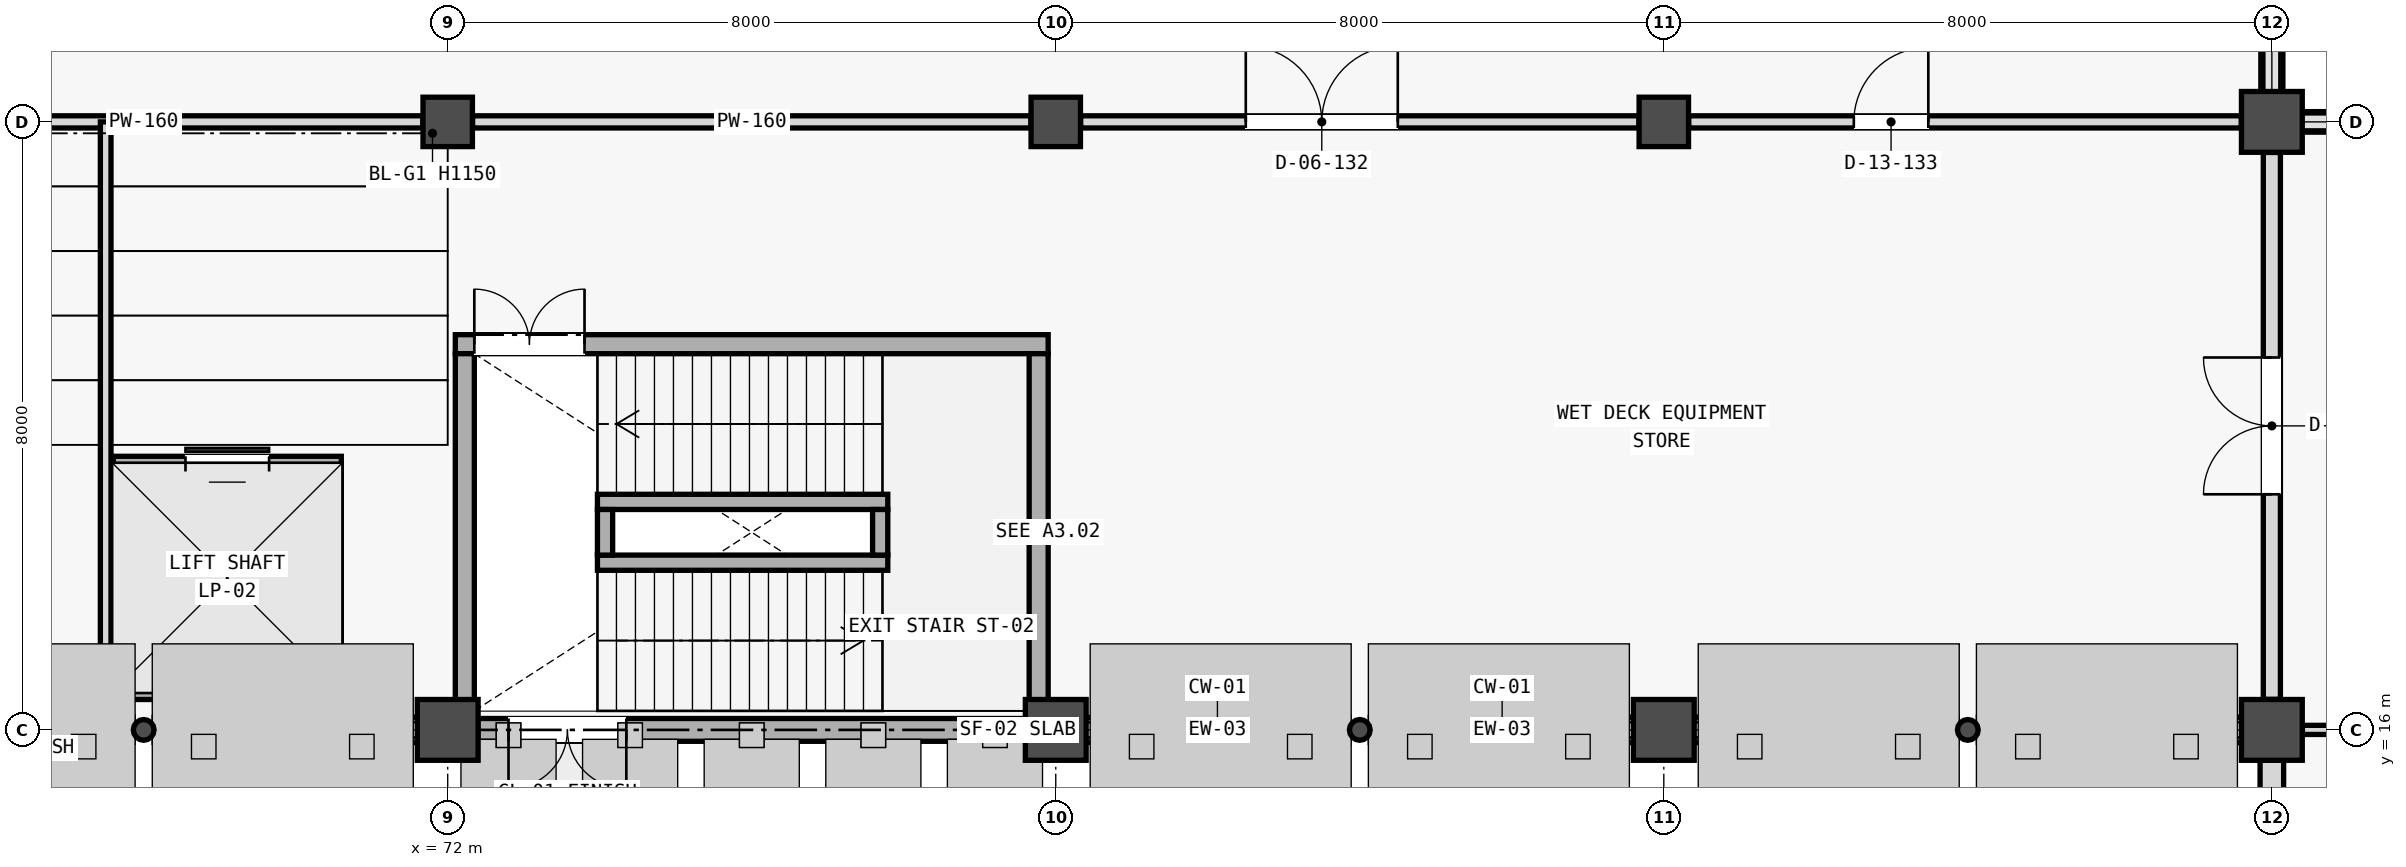
"""IFC4 building model, lengths in metres.
Left out: names, types, materials, properties, quantities, classifications, styles, units other than length and angle.
Written with IfcOpenShell. Run it as: python <this file> out.ifc"""

import sys

from ifc_helpers import new_model, si_unit, direction, frame, frame_2d, origin, origin_2d, place, context, subcontext, project, spatial, rectangle, hollow_circle, extrude, element, fill, save


model = new_model("IFC4")
c1 = context("Model", 3, precision=1e-05, world=origin(), true_north=direction((0.0, 1.0)))
c2 = subcontext(c1, "Body", "Model", "MODEL_VIEW")
j1 = project(units=[si_unit("LENGTHUNIT", "METRE"), si_unit("PLANEANGLEUNIT", "RADIAN")], contexts=[c1])
p1 = place(None, origin())
s1 = spatial("IfcSite", under=j1, at=p1, CompositionType="ELEMENT")
p2 = place(p1, origin())
s2 = spatial("IfcBuilding", under=s1, at=p2, CompositionType="ELEMENT")
p3 = place(p2, origin())
s3 = spatial("IfcBuildingStorey", under=s2, at=p3, CompositionType="ELEMENT", Elevation=0.0)
for number, where, z_axis, x_axis in (
    (1, (72.0, 16.0, 0.0), (0.0, 0.0, 1.0), (1.0, 0.0, 0.0)),
    (2, (80.0, 16.0, 0.0), (0.0, 0.0, 1.0), (1.0, 0.0, 0.0)),
    (3, (88.0, 16.0, 0.0), (0.0, 0.0, 1.0), (1.0, 0.0, 0.0)),
    (4, (96.0, 16.0, 0.0), (0.0, 0.0, 1.0), (1.0, 0.0, 0.0)),
    (5, (96.0, 24.0, 0.0), (0.0, 0.0, 1.0), (1.0, 0.0, 0.0)),
):
    element("IfcColumn", number, at=place(p3, frame(where, z_axis=z_axis, x_axis=x_axis)), inside=s3, PredefinedType="COLUMN", context=c2, shape_type="SweptSolid", body=[
        extrude(rectangle(XDim=0.8, YDim=0.8, at=origin_2d()), origin(), (0.0, 0.0, 1.0), 5.125),
    ])
for number, where, z_axis, x_axis in (
    (6, (72.0, 24.0, 0.0), (0.0, 0.0, 1.0), (1.0, 0.0, 0.0)),
    (7, (80.0, 24.0, 0.0), (0.0, 0.0, 1.0), (1.0, 0.0, 0.0)),
    (8, (88.0, 24.0, 0.0), (0.0, 0.0, 1.0), (1.0, 0.0, 0.0)),
):
    element("IfcColumn", number, at=place(p3, frame(where, z_axis=z_axis, x_axis=x_axis)), inside=s3, PredefinedType="COLUMN", context=c2, shape_type="SweptSolid", body=[
        extrude(rectangle(XDim=0.65, YDim=0.65, at=origin_2d()), origin(), (0.0, 0.0, 1.0), 5.125),
    ])
p4 = place(p3, frame((68.0, 16.0, 0.0), z_axis=(0.0, 0.0, 1.0), x_axis=(1.0, 0.0, 0.0)))
e9 = element("IfcColumn", 9, at=p4, inside=s3, PredefinedType="PILASTER", context=c2, shape_type="SweptSolid", body=[
    extrude(hollow_circle(Radius=0.136, WallThickness=0.012, at=origin_2d()), origin(), (0.0, 0.0, 1.0), 4.305),
])
for number, where, z_axis, x_axis in (
    (10, (64.396, 16.0, 0.0), (0.0, 0.0, 1.0), (1.0, 0.0, 0.0)),
    (11, (68.14, 16.0, 0.0), (0.0, 0.0, 1.0), (1.0, 0.0, 0.0)),
):
    element("IfcWall", number, at=place(p3, frame(where, z_axis=z_axis, x_axis=x_axis)), inside=s3, PredefinedType="STANDARD", context=c2, shape_type="SweptSolid", body=[
        extrude(rectangle(XDim=3.464, YDim=0.33, at=frame_2d((1.732, 0.0))), origin(), (0.0, 0.0, 1.0), 0.65),
    ])
p5 = place(p3, frame((64.396, 16.0, 3.328), z_axis=(0.0, 0.0, 1.0), x_axis=(1.0, 0.0, 0.0)))
e12 = element("IfcWall", 12, at=p5, inside=s3, PredefinedType="STANDARD", context=c2, shape_type="SweptSolid", body=[
    extrude(rectangle(XDim=3.464, YDim=0.33, at=frame_2d((1.732, 0.0))), origin(), (0.0, 0.0, 1.0), 0.977),
])
p6 = place(p3, frame((68.14, 16.0, 2.14), z_axis=(0.0, 0.0, 1.0), x_axis=(1.0, 0.0, 0.0)))
e13 = element("IfcWall", 13, at=p6, inside=s3, PredefinedType="STANDARD", context=c2, shape_type="SweptSolid", body=[
    extrude(rectangle(XDim=3.464, YDim=0.33, at=frame_2d((1.732, 0.0))), origin(), (0.0, 0.0, 1.0), 2.165),
])
p7 = place(p3, frame((72.396, 16.0, 0.0), z_axis=(0.0, 0.0, 1.0), x_axis=(1.0, 0.0, 0.0)))
e14 = element("IfcWall", 14, at=p7, inside=s3, PredefinedType="SHEAR", context=c2, shape_type="SweptSolid", body=[
    extrude(rectangle(XDim=7.208, YDim=0.3, at=frame_2d((3.604, 0.0))), origin(), (0.0, 0.0, 1.0), 5.4),
])
p8 = place(p7, frame((0.404, 0.0, 0.0)))
e15 = element("IfcOpeningElement", 15, at=p8, cuts=e14, PredefinedType="OPENING", context=c2, shape_type="SweptSolid", body=[
    extrude(rectangle(XDim=1.55, YDim=2.2, at=frame_2d((0.775, 1.1))), frame((0.0, 0.16, 0.0), z_axis=(0.0, -1.0, 0.0), x_axis=(1.0, 0.0, 0.0)), (0.0, 0.0, 1.0), 0.32),
])
p9 = place(p3, frame((84.0, 16.0, 0.0), z_axis=(0.0, 0.0, 1.0), x_axis=(1.0, 0.0, 0.0)))
e16 = element("IfcColumn", 16, at=p9, inside=s3, PredefinedType="PILASTER", context=c2, shape_type="SweptSolid", body=[
    extrude(hollow_circle(Radius=0.136, WallThickness=0.012, at=origin_2d()), origin(), (0.0, 0.0, 1.0), 4.305),
])
for number, where, z_axis, x_axis in (
    (17, (80.396, 16.0, 0.0), (0.0, 0.0, 1.0), (1.0, 0.0, 0.0)),
    (18, (84.14, 16.0, 0.0), (0.0, 0.0, 1.0), (1.0, 0.0, 0.0)),
):
    element("IfcWall", number, at=place(p3, frame(where, z_axis=z_axis, x_axis=x_axis)), inside=s3, PredefinedType="STANDARD", context=c2, shape_type="SweptSolid", body=[
        extrude(rectangle(XDim=3.464, YDim=0.33, at=frame_2d((1.732, 0.0))), origin(), (0.0, 0.0, 1.0), 0.65),
    ])
p10 = place(p3, frame((84.14, 16.0, 3.472), z_axis=(0.0, 0.0, 1.0), x_axis=(1.0, 0.0, 0.0)))
e19 = element("IfcWall", 19, at=p10, inside=s3, PredefinedType="STANDARD", context=c2, shape_type="SweptSolid", body=[
    extrude(rectangle(XDim=3.464, YDim=0.33, at=frame_2d((1.732, 0.0))), origin(), (0.0, 0.0, 1.0), 0.833),
])
p11 = place(p3, frame((92.0, 16.0, 0.0), z_axis=(0.0, 0.0, 1.0), x_axis=(1.0, 0.0, 0.0)))
e20 = element("IfcColumn", 20, at=p11, inside=s3, PredefinedType="PILASTER", context=c2, shape_type="SweptSolid", body=[
    extrude(hollow_circle(Radius=0.136, WallThickness=0.012, at=origin_2d()), origin(), (0.0, 0.0, 1.0), 4.305),
])
for number, where, z_axis, x_axis in (
    (21, (88.396, 16.0, 0.0), (0.0, 0.0, 1.0), (1.0, 0.0, 0.0)),
    (22, (92.14, 16.0, 0.0), (0.0, 0.0, 1.0), (1.0, 0.0, 0.0)),
):
    element("IfcWall", number, at=place(p3, frame(where, z_axis=z_axis, x_axis=x_axis)), inside=s3, PredefinedType="STANDARD", context=c2, shape_type="SweptSolid", body=[
        extrude(rectangle(XDim=3.464, YDim=0.33, at=frame_2d((1.732, 0.0))), origin(), (0.0, 0.0, 1.0), 0.65),
    ])
p12 = place(p3, frame((88.396, 16.0, 2.096), z_axis=(0.0, 0.0, 1.0), x_axis=(1.0, 0.0, 0.0)))
e23 = element("IfcWall", 23, at=p12, inside=s3, PredefinedType="STANDARD", context=c2, shape_type="SweptSolid", body=[
    extrude(rectangle(XDim=3.464, YDim=0.33, at=frame_2d((1.732, 0.0))), origin(), (0.0, 0.0, 1.0), 2.209),
])
p13 = place(p3, frame((92.14, 16.0, 2.549), z_axis=(0.0, 0.0, 1.0), x_axis=(1.0, 0.0, 0.0)))
e24 = element("IfcWall", 24, at=p13, inside=s3, PredefinedType="STANDARD", context=c2, shape_type="SweptSolid", body=[
    extrude(rectangle(XDim=3.464, YDim=0.33, at=frame_2d((1.732, 0.0))), origin(), (0.0, 0.0, 1.0), 1.756),
])
p14 = place(p3, frame((96.0, 24.396, 0.0), z_axis=(0.0, 0.0, 1.0), x_axis=(0.0, 1.0, 0.0)))
e25 = element("IfcWall", 25, at=p14, inside=s3, PredefinedType="STANDARD", context=c2, shape_type="SweptSolid", body=[
    extrude(rectangle(XDim=7.208, YDim=0.29, at=frame_2d((3.604, 0.0))), origin(), (0.0, 0.0, 1.0), 0.8),
])
p15 = place(p3, frame((96.396, 24.0, 0.0), z_axis=(0.0, 0.0, 1.0), x_axis=(1.0, 0.0, 0.0)))
e26 = element("IfcWall", 26, at=p15, inside=s3, PredefinedType="STANDARD", context=c2, shape_type="SweptSolid", body=[
    extrude(rectangle(XDim=7.383, YDim=0.27, at=frame_2d((3.691, 0.0))), origin(), (0.0, 0.0, 1.0), 0.8),
])
p16 = place(p3, frame((96.0, 8.321, 0.0), z_axis=(0.0, 0.0, 1.0), x_axis=(0.0, 1.0, 0.0)))
e27 = element("IfcWall", 27, at=p16, inside=s3, PredefinedType="STANDARD", context=c2, shape_type="SweptSolid", body=[
    extrude(rectangle(XDim=7.283, YDim=0.31, at=frame_2d((3.642, 0.0))), origin(), (0.0, 0.0, 1.0), 4.45),
])
p17 = place(p3, frame((72.1, 21.075, 0.0), z_axis=(0.0, 0.0, 1.0), x_axis=(1.0, 0.0, 0.0)))
e28 = element("IfcWall", 28, at=p17, inside=s3, PredefinedType="SHEAR", context=c2, shape_type="SweptSolid", body=[
    extrude(rectangle(XDim=7.8, YDim=0.25, at=frame_2d((3.9, 0.0))), origin(), (0.0, 0.0, 1.0), 5.4),
])
p18 = place(p17, frame((0.25, 0.0, 0.0)))
e29 = element("IfcOpeningElement", 29, at=p18, cuts=e28, PredefinedType="OPENING", context=c2, shape_type="SweptSolid", body=[
    extrude(rectangle(XDim=1.45, YDim=2.2, at=frame_2d((0.725, 1.1))), frame((0.0, 0.135, 0.0), z_axis=(0.0, -1.0, 0.0), x_axis=(1.0, 0.0, 0.0)), (0.0, 0.0, 1.0), 0.27),
])
for number, where, z_axis, x_axis in (
    (30, (72.225, 16.25, 0.0), (0.0, 0.0, 1.0), (0.0, 1.0, 0.0)),
    (31, (79.775, 16.25, 0.0), (0.0, 0.0, 1.0), (0.0, 1.0, 0.0)),
):
    element("IfcWall", number, at=place(p3, frame(where, z_axis=z_axis, x_axis=x_axis)), inside=s3, PredefinedType="SHEAR", context=c2, shape_type="SweptSolid", body=[
        extrude(rectangle(XDim=4.7, YDim=0.25, at=frame_2d((2.35, 0.0))), origin(), (0.0, 0.0, 1.0), 5.4),
    ])
for number, where, z_axis, x_axis in (
    (32, (73.97, 18.2, 0.0), (0.0, 0.0, 1.0), (1.0, 0.0, 0.0)),
    (33, (73.97, 19.0, 0.0), (0.0, 0.0, 1.0), (1.0, 0.0, 0.0)),
):
    element("IfcWall", number, at=place(p3, frame(where, z_axis=z_axis, x_axis=x_axis)), inside=s3, PredefinedType="SHEAR", context=c2, shape_type="SweptSolid", body=[
        extrude(rectangle(XDim=3.82, YDim=0.2, at=frame_2d((1.91, 0.0))), origin(), (0.0, 0.0, 1.0), 5.4),
    ])
for number, where, z_axis, x_axis in (
    (34, (74.07, 18.3, 0.0), (0.0, 0.0, 1.0), (0.0, 1.0, 0.0)),
    (35, (77.69, 18.3, 0.0), (0.0, 0.0, 1.0), (0.0, 1.0, 0.0)),
):
    element("IfcWall", number, at=place(p3, frame(where, z_axis=z_axis, x_axis=x_axis)), inside=s3, PredefinedType="SHEAR", context=c2, shape_type="SweptSolid", body=[
        extrude(rectangle(XDim=0.6, YDim=0.2, at=frame_2d((0.3, 0.0))), origin(), (0.0, 0.0, 1.0), 5.4),
    ])
p19 = place(p3, frame((67.6, 16.5, 0.0), z_axis=(0.0, 0.0, 1.0), x_axis=(1.0, 0.0, 0.0)))
e36 = element("IfcWall", 36, at=p19, inside=s3, PredefinedType="SHEAR", context=c2, shape_type="SweptSolid", body=[
    extrude(rectangle(XDim=3.0, YDim=0.2, at=frame_2d((1.5, 0.0))), origin(), (0.0, 0.0, 1.0), 5.4),
])
p20 = place(p3, frame((67.6, 19.5, 0.0), z_axis=(0.0, 0.0, 1.0), x_axis=(1.0, 0.0, 0.0)))
e37 = element("IfcWall", 37, at=p20, inside=s3, PredefinedType="SHEAR", context=c2, shape_type="SweptSolid", body=[
    extrude(rectangle(XDim=3.0, YDim=0.2, at=frame_2d((1.5, 0.0))), origin(), (0.0, 0.0, 1.0), 5.4),
])
p21 = place(p20, frame((0.95, 0.0, 0.0)))
e38 = element("IfcOpeningElement", 38, at=p21, cuts=e37, PredefinedType="OPENING", context=c2, shape_type="SweptSolid", body=[
    extrude(rectangle(XDim=1.1, YDim=2.2, at=frame_2d((0.55, 1.1))), frame((0.0, 0.11, 0.0), z_axis=(0.0, -1.0, 0.0), x_axis=(1.0, 0.0, 0.0)), (0.0, 0.0, 1.0), 0.22),
])
for number, where, z_axis, x_axis in (
    (39, (67.7, 16.6, 0.0), (0.0, 0.0, 1.0), (0.0, 1.0, 0.0)),
    (40, (70.5, 16.6, 0.0), (0.0, 0.0, 1.0), (0.0, 1.0, 0.0)),
):
    element("IfcWall", number, at=place(p3, frame(where, z_axis=z_axis, x_axis=x_axis)), inside=s3, PredefinedType="SHEAR", context=c2, shape_type="SweptSolid", body=[
        extrude(rectangle(XDim=2.8, YDim=0.2, at=frame_2d((1.4, 0.0))), origin(), (0.0, 0.0, 1.0), 5.4),
    ])
p22 = place(p3, frame((96.0, 16.402, 0.0), z_axis=(0.0, 0.0, 1.0), x_axis=(0.0, 1.0, 0.0)))
e41 = element("IfcWall", 41, at=p22, inside=s3, PredefinedType="STANDARD", context=c2, shape_type="SweptSolid", body=[
    extrude(rectangle(XDim=7.196, YDim=0.225, at=frame_2d((3.598, 0.0))), origin(), (0.0, 0.0, 1.0), 4.555),
])
p23 = place(p22, frame((2.698, 0.0, 0.0)))
e42 = element("IfcOpeningElement", 42, at=p23, cuts=e41, PredefinedType="OPENING", context=c2, shape_type="SweptSolid", body=[
    extrude(rectangle(XDim=1.8, YDim=2.3, at=frame_2d((0.9, 1.15))), frame((0.0, 0.123, 0.0), z_axis=(0.0, -1.0, 0.0), x_axis=(1.0, 0.0, 0.0)), (0.0, 0.0, 1.0), 0.245),
])
for number, where, z_axis, x_axis in (
    (43, (64.327, 24.0, 0.0), (0.0, 0.0, 1.0), (1.0, 0.0, 0.0)),
    (44, (72.327, 24.0, 0.0), (0.0, 0.0, 1.0), (1.0, 0.0, 0.0)),
):
    element("IfcWall", number, at=place(p3, frame(where, z_axis=z_axis, x_axis=x_axis)), inside=s3, PredefinedType="PARTITIONING", context=c2, shape_type="SweptSolid", body=[
        extrude(rectangle(XDim=7.346, YDim=0.16, at=frame_2d((3.673, 0.0))), origin(), (0.0, 0.0, 1.0), 4.355),
    ])
p24 = place(p3, frame((80.327, 24.0, 0.0), z_axis=(0.0, 0.0, 1.0), x_axis=(1.0, 0.0, 0.0)))
e45 = element("IfcWall", 45, at=p24, inside=s3, PredefinedType="PARTITIONING", context=c2, shape_type="SweptSolid", body=[
    extrude(rectangle(XDim=7.346, YDim=0.16, at=frame_2d((3.673, 0.0))), origin(), (0.0, 0.0, 1.0), 4.355),
])
p25 = place(p24, frame((2.173, 0.0, 0.0)))
e46 = element("IfcOpeningElement", 46, at=p25, cuts=e45, PredefinedType="OPENING", context=c2, shape_type="SweptSolid", body=[
    extrude(rectangle(XDim=2.0, YDim=2.4, at=frame_2d((1.0, 1.2))), frame((0.0, 0.09, 0.0), z_axis=(0.0, -1.0, 0.0), x_axis=(1.0, 0.0, 0.0)), (0.0, 0.0, 1.0), 0.18),
])
p26 = place(p3, frame((88.327, 24.0, 0.0), z_axis=(0.0, 0.0, 1.0), x_axis=(1.0, 0.0, 0.0)))
e47 = element("IfcWall", 47, at=p26, inside=s3, PredefinedType="PARTITIONING", context=c2, shape_type="SweptSolid", body=[
    extrude(rectangle(XDim=7.271, YDim=0.16, at=frame_2d((3.635, 0.0))), origin(), (0.0, 0.0, 1.0), 4.355),
])
p27 = place(p26, frame((2.173, 0.0, 0.0)))
e48 = element("IfcOpeningElement", 48, at=p27, cuts=e47, PredefinedType="OPENING", context=c2, shape_type="SweptSolid", body=[
    extrude(rectangle(XDim=0.98, YDim=2.1, at=frame_2d((0.49, 1.05))), frame((0.0, 0.09, 0.0), z_axis=(0.0, -1.0, 0.0), x_axis=(1.0, 0.0, 0.0)), (0.0, 0.0, 1.0), 0.18),
])
p28 = place(p3, frame((67.5, 16.18, 0.0), z_axis=(0.0, 0.0, 1.0), x_axis=(0.0, 1.0, 0.0)))
e49 = element("IfcWall", 49, at=p28, inside=s3, PredefinedType="PLUMBINGWALL", context=c2, shape_type="SweptSolid", body=[
    extrude(rectangle(XDim=7.82, YDim=0.14, at=frame_2d((3.91, 0.0))), origin(), (0.0, 0.0, 1.0), 4.305),
])
p29 = place(p3, frame((96.402, 16.0, 0.0), z_axis=(0.0, 0.0, 1.0), x_axis=(1.0, 0.0, 0.0)))
e50 = element("IfcWall", 50, at=p29, inside=s3, PredefinedType="PARTITIONING", context=c2, shape_type="SweptSolid", body=[
    extrude(rectangle(XDim=15.598, YDim=0.12, at=frame_2d((7.799, 0.0))), origin(), (0.0, 0.0, 1.0), 3.755),
])
p30 = place(p29, frame((10.098, 0.0, 0.0)))
e51 = element("IfcOpeningElement", 51, at=p30, cuts=e50, PredefinedType="OPENING", context=c2, shape_type="SweptSolid", body=[
    extrude(rectangle(XDim=2.2, YDim=2.4, at=frame_2d((1.1, 1.2))), frame((0.0, 0.07, 0.0), z_axis=(0.0, -1.0, 0.0), x_axis=(1.0, 0.0, 0.0)), (0.0, 0.0, 1.0), 0.14),
])
p31 = place(p8, frame((1.55, 0.0, 0.0), z_axis=(0.0, 0.0, 1.0), x_axis=(-1.0, 0.0, 0.0)))
e52 = element("IfcDoor", 52, at=p31, inside=s3, OperationType="DOUBLE_DOOR_SINGLE_SWING", PredefinedType="DOOR", context=c2, shape_type="SweptSolid", body=[
    extrude(rectangle(XDim=1.55, YDim=2.2, at=frame_2d((0.775, 1.1))), frame((0.0, 0.025, 0.0), z_axis=(0.0, -1.0, 0.0), x_axis=(1.0, 0.0, 0.0)), (0.0, 0.0, 1.0), 0.05),
])
fill(e15, e52)
p32 = place(p18, origin())
e53 = element("IfcDoor", 53, at=p32, inside=s3, OperationType="DOUBLE_DOOR_SINGLE_SWING", PredefinedType="DOOR", context=c2, shape_type="SweptSolid", body=[
    extrude(rectangle(XDim=1.45, YDim=2.2, at=frame_2d((0.725, 1.1))), frame((0.0, 0.025, 0.0), z_axis=(0.0, -1.0, 0.0), x_axis=(1.0, 0.0, 0.0)), (0.0, 0.0, 1.0), 0.05),
])
fill(e29, e53)
p33 = place(p21, origin())
e54 = element("IfcDoor", 54, at=p33, inside=s3, OperationType="SLIDING_TO_LEFT", PredefinedType="DOOR", context=c2, shape_type="SweptSolid", body=[
    extrude(rectangle(XDim=1.1, YDim=2.2, at=frame_2d((0.55, 1.1))), frame((0.0, 0.025, 0.0), z_axis=(0.0, -1.0, 0.0), x_axis=(1.0, 0.0, 0.0)), (0.0, 0.0, 1.0), 0.05),
])
fill(e38, e54)
p34 = place(p23, origin())
e55 = element("IfcDoor", 55, at=p34, inside=s3, OperationType="DOUBLE_DOOR_SINGLE_SWING", PredefinedType="DOOR", context=c2, shape_type="SweptSolid", body=[
    extrude(rectangle(XDim=1.8, YDim=2.3, at=frame_2d((0.9, 1.15))), frame((0.0, 0.025, 0.0), z_axis=(0.0, -1.0, 0.0), x_axis=(1.0, 0.0, 0.0)), (0.0, 0.0, 1.0), 0.05),
])
fill(e42, e55)
p35 = place(p25, origin())
e56 = element("IfcDoor", 56, at=p35, inside=s3, OperationType="DOUBLE_DOOR_SINGLE_SWING", PredefinedType="DOOR", context=c2, shape_type="SweptSolid", body=[
    extrude(rectangle(XDim=2.0, YDim=2.4, at=frame_2d((1.0, 1.2))), frame((0.0, 0.025, 0.0), z_axis=(0.0, -1.0, 0.0), x_axis=(1.0, 0.0, 0.0)), (0.0, 0.0, 1.0), 0.05),
])
fill(e46, e56)
p36 = place(p27, origin())
e57 = element("IfcDoor", 57, at=p36, inside=s3, OperationType="SINGLE_SWING_RIGHT", PredefinedType="DOOR", context=c2, shape_type="SweptSolid", body=[
    extrude(rectangle(XDim=0.98, YDim=2.1, at=frame_2d((0.49, 1.05))), frame((0.0, 0.025, 0.0), z_axis=(0.0, -1.0, 0.0), x_axis=(1.0, 0.0, 0.0)), (0.0, 0.0, 1.0), 0.05),
])
fill(e48, e57)
save(model, sys.argv[1])
